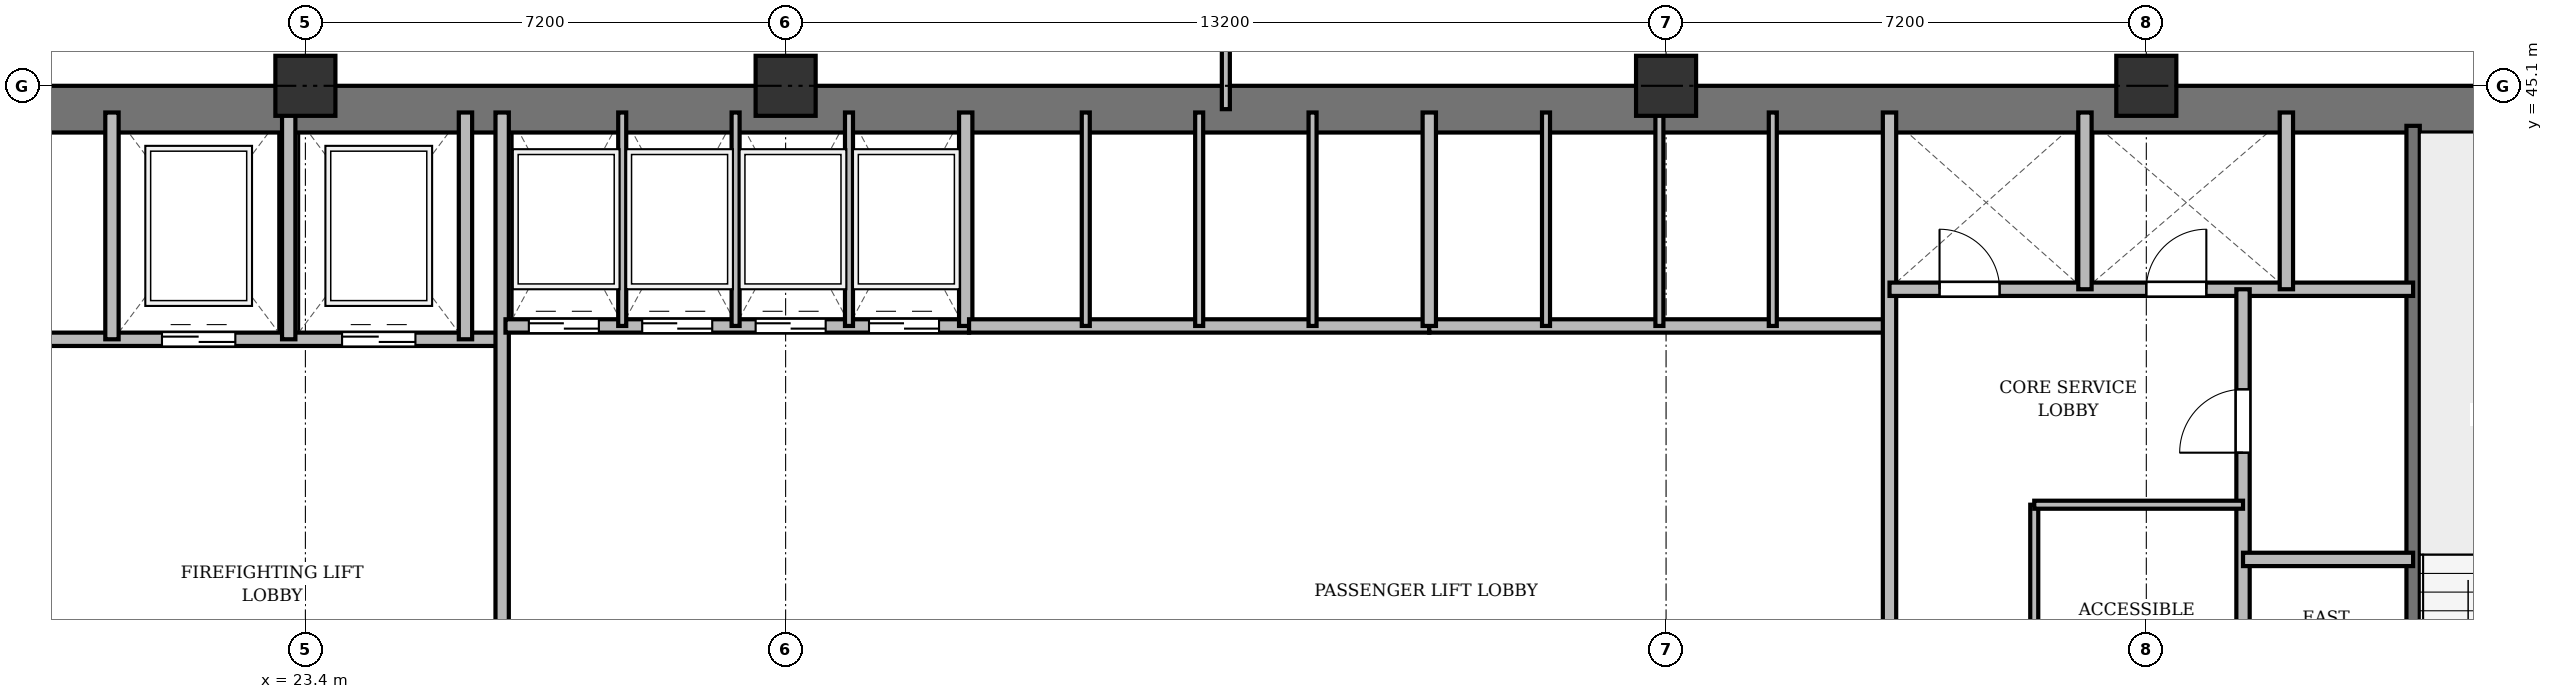
"""IFC4 building model, lengths in metres.
Left out: names, types, materials, properties, quantities, classifications, styles, units other than length and angle.
Written with IfcOpenShell. Run it as: python <this file> out.ifc"""

import sys

from ifc_helpers import new_model, si_unit, direction, frame, frame_2d, origin, origin_2d, place, context, subcontext, project, spatial, rectangle, extrude, source, transform, mapped, element, fill, save


model = new_model("IFC4")
c1 = context("Model", 3, precision=1e-05, world=origin(), true_north=direction((0.0, 1.0)))
c2 = subcontext(c1, "Body", "Model", "MODEL_VIEW")
j1 = project(units=[si_unit("LENGTHUNIT", "METRE"), si_unit("PLANEANGLEUNIT", "RADIAN")], contexts=[c1])
p1 = place(None, origin())
s1 = spatial("IfcSite", under=j1, at=p1, CompositionType="ELEMENT")
p2 = place(p1, origin())
s2 = spatial("IfcBuilding", under=s1, at=p2, CompositionType="ELEMENT")
p3 = place(p2, frame((0.0, 0.0, 55.9)))
s3 = spatial("IfcBuildingStorey", under=s2, at=p3, CompositionType="ELEMENT", Elevation=55.9)
m1 = source(origin(), c2, "Body", "SweptSolid", [
    extrude(rectangle(XDim=0.9, YDim=0.9, at=origin_2d()), origin(), (0.0, 0.0, 1.0), 3.6),
])
for number, where, z_axis, x_axis in (
    (1, (23.4, 45.1, 0.0), (0.0, 0.0, 1.0), (1.0, 0.0, 0.0)),
    (2, (30.6, 45.1, 0.0), (0.0, 0.0, 1.0), (1.0, 0.0, 0.0)),
    (3, (43.8, 45.1, 0.0), (0.0, 0.0, 1.0), (1.0, 0.0, 0.0)),
    (4, (51.0, 45.1, 0.0), (0.0, 0.0, 1.0), (1.0, 0.0, 0.0)),
):
    element("IfcColumn", number, at=place(p3, frame(where, z_axis=z_axis, x_axis=x_axis)), inside=s3, PredefinedType="COLUMN", context=c2, shape_type="MappedRepresentation", body=[
        mapped(m1, transform((0.0, 0.0, 0.0), x_axis=(1.0, 0.0, 0.0), y_axis=(0.0, 1.0, 0.0), z_axis=(0.0, 0.0, 1.0), scale=1.0)),
    ])
p4 = place(p3, frame((15.5, 44.75, 0.0), z_axis=(0.0, 0.0, 1.0), x_axis=(1.0, 0.0, 0.0)))
e5 = element("IfcWall", 5, at=p4, inside=s3, PredefinedType="SHEAR", context=c2, shape_type="SweptSolid", body=[
    extrude(rectangle(XDim=43.4, YDim=0.7, at=frame_2d((21.7, 0.0))), origin(), (0.0, 0.0, 1.0), 3.34),
])
p5 = place(p3, frame((55.0, 33.4, 0.0), z_axis=(0.0, 0.0, 1.0), x_axis=(0.0, 1.0, 0.0)))
e6 = element("IfcWall", 6, at=p5, inside=s3, PredefinedType="SHEAR", context=c2, shape_type="SweptSolid", body=[
    extrude(rectangle(XDim=11.1, YDim=0.2, at=frame_2d((5.55, 0.0))), origin(), (0.0, 0.0, 1.0), 3.34),
])
p6 = place(p5, frame((0.85, 0.0, 0.0)))
e7 = element("IfcOpeningElement", 7, at=p6, cuts=e6, PredefinedType="OPENING", context=c2, shape_type="SweptSolid", body=[
    extrude(rectangle(XDim=1.1, YDim=2.15, at=frame_2d((0.55, 1.075))), frame((0.0, 0.11, 0.0), z_axis=(0.0, -1.0, 0.0), x_axis=(1.0, 0.0, 0.0)), (0.0, 0.0, 1.0), 0.22),
])
p7 = place(p3, frame((19.55, 41.3, 0.0), z_axis=(0.0, 0.0, 1.0), x_axis=(1.0, 0.0, 0.0)))
e8 = element("IfcWall", 8, at=p7, inside=s3, PredefinedType="SOLIDWALL", context=c2, shape_type="SweptSolid", body=[
    extrude(rectangle(XDim=6.75, YDim=0.2, at=frame_2d((3.375, 0.0))), origin(), (0.0, 0.0, 1.0), 3.34),
])
p8 = place(p7, frame((1.7, 0.0, 0.0)))
e9 = element("IfcOpeningElement", 9, at=p8, cuts=e8, PredefinedType="OPENING", context=c2, shape_type="SweptSolid", body=[
    extrude(rectangle(XDim=1.1, YDim=2.15, at=frame_2d((0.55, 1.075))), frame((0.0, 0.11, 0.0), z_axis=(0.0, -1.0, 0.0), x_axis=(1.0, 0.0, 0.0)), (0.0, 0.0, 1.0), 0.22),
])
p9 = place(p7, frame((4.4, 0.0, 0.0)))
e10 = element("IfcOpeningElement", 10, at=p9, cuts=e8, PredefinedType="OPENING", context=c2, shape_type="SweptSolid", body=[
    extrude(rectangle(XDim=1.1, YDim=2.15, at=frame_2d((0.55, 1.075))), frame((0.0, 0.11, 0.0), z_axis=(0.0, -1.0, 0.0), x_axis=(1.0, 0.0, 0.0)), (0.0, 0.0, 1.0), 0.22),
])
for number, where, z_axis, x_axis in (
    (11, (20.5, 41.3, 0.0), (0.0, 0.0, 1.0), (0.0, 1.0, 0.0)),
    (12, (23.15, 41.3, 0.0), (0.0, 0.0, 1.0), (0.0, 1.0, 0.0)),
    (13, (25.8, 41.3, 0.0), (0.0, 0.0, 1.0), (0.0, 1.0, 0.0)),
):
    element("IfcWall", number, at=place(p3, frame(where, z_axis=z_axis, x_axis=x_axis)), inside=s3, PredefinedType="SOLIDWALL", context=c2, shape_type="SweptSolid", body=[
        extrude(rectangle(XDim=3.4, YDim=0.2, at=frame_2d((1.7, 0.0))), origin(), (0.0, 0.0, 1.0), 3.34),
    ])
p10 = place(p3, frame((26.35, 33.4, 0.0), z_axis=(0.0, 0.0, 1.0), x_axis=(0.0, 1.0, 0.0)))
e14 = element("IfcWall", 14, at=p10, inside=s3, PredefinedType="SOLIDWALL", context=c2, shape_type="SweptSolid", body=[
    extrude(rectangle(XDim=11.3, YDim=0.2, at=frame_2d((5.65, 0.0))), origin(), (0.0, 0.0, 1.0), 2.69),
])
p11 = place(p3, frame((26.4, 41.5, 0.0), z_axis=(0.0, 0.0, 1.0), x_axis=(1.0, 0.0, 0.0)))
e15 = element("IfcWall", 15, at=p11, inside=s3, PredefinedType="SOLIDWALL", context=c2, shape_type="SweptSolid", body=[
    extrude(rectangle(XDim=6.95, YDim=0.2, at=frame_2d((3.475, 0.0))), origin(), (0.0, 0.0, 1.0), 3.34),
])
p12 = place(p11, frame((0.35, 0.0, 0.0)))
e16 = element("IfcOpeningElement", 16, at=p12, cuts=e15, PredefinedType="OPENING", context=c2, shape_type="SweptSolid", body=[
    extrude(rectangle(XDim=1.05, YDim=2.15, at=frame_2d((0.525, 1.075))), frame((0.0, 0.11, 0.0), z_axis=(0.0, -1.0, 0.0), x_axis=(1.0, 0.0, 0.0)), (0.0, 0.0, 1.0), 0.22),
])
p13 = place(p11, frame((2.05, 0.0, 0.0)))
e17 = element("IfcOpeningElement", 17, at=p13, cuts=e15, PredefinedType="OPENING", context=c2, shape_type="SweptSolid", body=[
    extrude(rectangle(XDim=1.05, YDim=2.15, at=frame_2d((0.525, 1.075))), frame((0.0, 0.11, 0.0), z_axis=(0.0, -1.0, 0.0), x_axis=(1.0, 0.0, 0.0)), (0.0, 0.0, 1.0), 0.22),
])
p14 = place(p11, frame((3.75, 0.0, 0.0)))
e18 = element("IfcOpeningElement", 18, at=p14, cuts=e15, PredefinedType="OPENING", context=c2, shape_type="SweptSolid", body=[
    extrude(rectangle(XDim=1.05, YDim=2.15, at=frame_2d((0.525, 1.075))), frame((0.0, 0.11, 0.0), z_axis=(0.0, -1.0, 0.0), x_axis=(1.0, 0.0, 0.0)), (0.0, 0.0, 1.0), 0.22),
])
p15 = place(p11, frame((5.45, 0.0, 0.0)))
e19 = element("IfcOpeningElement", 19, at=p15, cuts=e15, PredefinedType="OPENING", context=c2, shape_type="SweptSolid", body=[
    extrude(rectangle(XDim=1.05, YDim=2.15, at=frame_2d((0.525, 1.075))), frame((0.0, 0.11, 0.0), z_axis=(0.0, -1.0, 0.0), x_axis=(1.0, 0.0, 0.0)), (0.0, 0.0, 1.0), 0.22),
])
p16 = place(p3, frame((33.3, 41.5, 0.0), z_axis=(0.0, 0.0, 1.0), x_axis=(0.0, 1.0, 0.0)))
e20 = element("IfcWall", 20, at=p16, inside=s3, PredefinedType="SOLIDWALL", context=c2, shape_type="SweptSolid", body=[
    extrude(rectangle(XDim=3.2, YDim=0.2, at=frame_2d((1.6, 0.0))), origin(), (0.0, 0.0, 1.0), 3.34),
])
for number, where, z_axis, x_axis in (
    (21, (28.15, 41.5, 0.0), (0.0, 0.0, 1.0), (0.0, 1.0, 0.0)),
    (22, (29.85, 41.5, 0.0), (0.0, 0.0, 1.0), (0.0, 1.0, 0.0)),
    (23, (31.55, 41.5, 0.0), (0.0, 0.0, 1.0), (0.0, 1.0, 0.0)),
):
    element("IfcWall", number, at=place(p3, frame(where, z_axis=z_axis, x_axis=x_axis)), inside=s3, PredefinedType="PARTITIONING", context=c2, shape_type="SweptSolid", body=[
        extrude(rectangle(XDim=3.2, YDim=0.12, at=frame_2d((1.6, 0.0))), origin(), (0.0, 0.0, 1.0), 3.34),
    ])
p17 = place(p3, frame((33.35, 41.5, 0.0), z_axis=(0.0, 0.0, 1.0), x_axis=(1.0, 0.0, 0.0)))
e24 = element("IfcWall", 24, at=p17, inside=s3, PredefinedType="SOLIDWALL", context=c2, shape_type="SweptSolid", body=[
    extrude(rectangle(XDim=6.9, YDim=0.2, at=frame_2d((3.45, 0.0))), origin(), (0.0, 0.0, 1.0), 3.34),
])
for number, where, z_axis, x_axis in (
    (25, (35.1, 41.5, 0.0), (0.0, 0.0, 1.0), (0.0, 1.0, 0.0)),
    (26, (36.8, 41.5, 0.0), (0.0, 0.0, 1.0), (0.0, 1.0, 0.0)),
    (27, (38.5, 41.5, 0.0), (0.0, 0.0, 1.0), (0.0, 1.0, 0.0)),
):
    element("IfcWall", number, at=place(p3, frame(where, z_axis=z_axis, x_axis=x_axis)), inside=s3, PredefinedType="PARTITIONING", context=c2, shape_type="SweptSolid", body=[
        extrude(rectangle(XDim=3.2, YDim=0.12, at=frame_2d((1.6, 0.0))), origin(), (0.0, 0.0, 1.0), 3.34),
    ])
p18 = place(p3, frame((40.25, 41.5, 0.0), z_axis=(0.0, 0.0, 1.0), x_axis=(1.0, 0.0, 0.0)))
e28 = element("IfcWall", 28, at=p18, inside=s3, PredefinedType="SOLIDWALL", context=c2, shape_type="SweptSolid", body=[
    extrude(rectangle(XDim=6.9, YDim=0.2, at=frame_2d((3.45, 0.0))), origin(), (0.0, 0.0, 1.0), 2.752),
])
p19 = place(p3, frame((40.25, 41.5, 0.0), z_axis=(0.0, 0.0, 1.0), x_axis=(0.0, 1.0, 0.0)))
e29 = element("IfcWall", 29, at=p19, inside=s3, PredefinedType="SOLIDWALL", context=c2, shape_type="SweptSolid", body=[
    extrude(rectangle(XDim=3.2, YDim=0.2, at=frame_2d((1.6, 0.0))), origin(), (0.0, 0.0, 1.0), 3.34),
])
p20 = place(p3, frame((42.0, 41.5, 0.0), z_axis=(0.0, 0.0, 1.0), x_axis=(0.0, 1.0, 0.0)))
e30 = element("IfcWall", 30, at=p20, inside=s3, PredefinedType="PARTITIONING", context=c2, shape_type="SweptSolid", body=[
    extrude(rectangle(XDim=3.2, YDim=0.12, at=frame_2d((1.6, 0.0))), origin(), (0.0, 0.0, 1.0), 3.34),
])
p21 = place(p3, frame((43.7, 41.5, 0.0), z_axis=(0.0, 0.0, 1.0), x_axis=(0.0, 1.0, 0.0)))
e31 = element("IfcWall", 31, at=p21, inside=s3, PredefinedType="PARTITIONING", context=c2, shape_type="SweptSolid", body=[
    extrude(rectangle(XDim=3.2, YDim=0.12, at=frame_2d((1.6, 0.0))), origin(), (0.0, 0.0, 1.0), 2.752),
])
p22 = place(p3, frame((45.4, 41.5, 0.0), z_axis=(0.0, 0.0, 1.0), x_axis=(0.0, 1.0, 0.0)))
e32 = element("IfcWall", 32, at=p22, inside=s3, PredefinedType="PARTITIONING", context=c2, shape_type="SweptSolid", body=[
    extrude(rectangle(XDim=3.2, YDim=0.12, at=frame_2d((1.6, 0.0))), origin(), (0.0, 0.0, 1.0), 3.34),
])
p23 = place(p3, frame((47.15, 33.4, 0.0), z_axis=(0.0, 0.0, 1.0), x_axis=(0.0, 1.0, 0.0)))
e33 = element("IfcWall", 33, at=p23, inside=s3, PredefinedType="SOLIDWALL", context=c2, shape_type="SweptSolid", body=[
    extrude(rectangle(XDim=11.3, YDim=0.2, at=frame_2d((5.65, 0.0))), origin(), (0.0, 0.0, 1.0), 2.69),
])
p24 = place(p3, frame((47.15, 42.05, 0.0), z_axis=(0.0, 0.0, 1.0), x_axis=(1.0, 0.0, 0.0)))
e34 = element("IfcWall", 34, at=p24, inside=s3, PredefinedType="SOLIDWALL", context=c2, shape_type="SweptSolid", body=[
    extrude(rectangle(XDim=7.85, YDim=0.2, at=frame_2d((3.925, 0.0))), origin(), (0.0, 0.0, 1.0), 2.752),
])
p25 = place(p24, frame((0.75, 0.0, 0.0)))
e35 = element("IfcOpeningElement", 35, at=p25, cuts=e34, PredefinedType="OPENING", context=c2, shape_type="SweptSolid", body=[
    extrude(rectangle(XDim=0.9, YDim=2.1, at=frame_2d((0.45, 1.05))), frame((0.0, 0.11, 0.0), z_axis=(0.0, -1.0, 0.0), x_axis=(1.0, 0.0, 0.0)), (0.0, 0.0, 1.0), 0.22),
])
p26 = place(p24, frame((3.85, 0.0, 0.0)))
e36 = element("IfcOpeningElement", 36, at=p26, cuts=e34, PredefinedType="OPENING", context=c2, shape_type="SweptSolid", body=[
    extrude(rectangle(XDim=0.9, YDim=2.1, at=frame_2d((0.45, 1.05))), frame((0.0, 0.11, 0.0), z_axis=(0.0, -1.0, 0.0), x_axis=(1.0, 0.0, 0.0)), (0.0, 0.0, 1.0), 0.22),
])
for number, where, z_axis, x_axis in (
    (37, (50.08, 42.05, 0.0), (0.0, 0.0, 1.0), (0.0, 1.0, 0.0)),
    (38, (53.1, 42.05, 0.0), (0.0, 0.0, 1.0), (0.0, 1.0, 0.0)),
):
    element("IfcWall", number, at=place(p3, frame(where, z_axis=z_axis, x_axis=x_axis)), inside=s3, PredefinedType="SOLIDWALL", context=c2, shape_type="SweptSolid", body=[
        extrude(rectangle(XDim=2.65, YDim=0.2, at=frame_2d((1.325, 0.0))), origin(), (0.0, 0.0, 1.0), 3.34),
    ])
p27 = place(p3, frame((52.45, 33.4, 0.0), z_axis=(0.0, 0.0, 1.0), x_axis=(0.0, 1.0, 0.0)))
e39 = element("IfcWall", 39, at=p27, inside=s3, PredefinedType="PARTITIONING", context=c2, shape_type="SweptSolid", body=[
    extrude(rectangle(XDim=8.65, YDim=0.2, at=frame_2d((4.325, 0.0))), origin(), (0.0, 0.0, 1.0), 2.69),
])
p28 = place(p27, frame((6.2, 0.0, 0.0)))
e40 = element("IfcOpeningElement", 40, at=p28, cuts=e39, PredefinedType="OPENING", context=c2, shape_type="SweptSolid", body=[
    extrude(rectangle(XDim=0.95, YDim=2.15, at=frame_2d((0.475, 1.075))), frame((0.0, 0.11, 0.0), z_axis=(0.0, -1.0, 0.0), x_axis=(1.0, 0.0, 0.0)), (0.0, 0.0, 1.0), 0.22),
])
p29 = place(p3, frame((52.45, 38.0, 0.0), z_axis=(0.0, 0.0, 1.0), x_axis=(1.0, 0.0, 0.0)))
e41 = element("IfcWall", 41, at=p29, inside=s3, PredefinedType="PARTITIONING", context=c2, shape_type="SweptSolid", body=[
    extrude(rectangle(XDim=2.55, YDim=0.2, at=frame_2d((1.275, 0.0))), origin(), (0.0, 0.0, 1.0), 3.34),
])
p30 = place(p3, frame((49.32, 33.4, 0.0), z_axis=(0.0, 0.0, 1.0), x_axis=(0.0, 1.0, 0.0)))
e42 = element("IfcWall", 42, at=p30, inside=s3, PredefinedType="PARTITIONING", context=c2, shape_type="SweptSolid", body=[
    extrude(rectangle(XDim=5.42, YDim=0.12, at=frame_2d((2.71, 0.0))), origin(), (0.0, 0.0, 1.0), 2.69),
])
p31 = place(p30, frame((1.6, 0.0, 0.0)))
e43 = element("IfcOpeningElement", 43, at=p31, cuts=e42, PredefinedType="OPENING", context=c2, shape_type="SweptSolid", body=[
    extrude(rectangle(XDim=0.95, YDim=2.15, at=frame_2d((0.475, 1.075))), frame((0.0, 0.07, 0.0), z_axis=(0.0, -1.0, 0.0), x_axis=(1.0, 0.0, 0.0)), (0.0, 0.0, 1.0), 0.14),
])
p32 = place(p3, frame((49.32, 38.82, 0.0), z_axis=(0.0, 0.0, 1.0), x_axis=(1.0, 0.0, 0.0)))
e44 = element("IfcWall", 44, at=p32, inside=s3, PredefinedType="PARTITIONING", context=c2, shape_type="SweptSolid", body=[
    extrude(rectangle(XDim=3.13, YDim=0.12, at=frame_2d((1.565, 0.0))), origin(), (0.0, 0.0, 1.0), 2.752),
])
p33 = place(p3, frame((37.2, 44.75, 0.0), z_axis=(0.0, 0.0, 1.0), x_axis=(0.0, 1.0, 0.0)))
e45 = element("IfcWall", 45, at=p33, inside=s3, PredefinedType="PARTITIONING", context=c2, shape_type="SweptSolid", body=[
    extrude(rectangle(XDim=3.61, YDim=0.12, at=frame_2d((1.805, 0.0))), origin(), (0.0, 0.0, 1.0), 2.69),
])
p34 = place(p33, frame((1.1, 0.0, 0.0)))
e46 = element("IfcOpeningElement", 46, at=p34, cuts=e45, PredefinedType="OPENING", context=c2, shape_type="SweptSolid", body=[
    extrude(rectangle(XDim=0.95, YDim=2.15, at=frame_2d((0.475, 1.075))), frame((0.0, 0.07, 0.0), z_axis=(0.0, -1.0, 0.0), x_axis=(1.0, 0.0, 0.0)), (0.0, 0.0, 1.0), 0.14),
])
m2 = source(origin(), c2, "Body", "SweptSolid", [
    extrude(rectangle(XDim=1.1, YDim=2.15, at=frame_2d((0.55, 1.075))), frame((0.0, 0.025, 0.0), z_axis=(0.0, -1.0, 0.0), x_axis=(1.0, 0.0, 0.0)), (0.0, 0.0, 1.0), 0.05),
])
p35 = place(p8, origin())
e47 = element("IfcDoor", 47, at=p35, inside=s3, OperationType="DOUBLE_DOOR_SLIDING", PredefinedType="DOOR", context=c2, shape_type="MappedRepresentation", body=[
    mapped(m2, transform((0.0, 0.0, 0.0), x_axis=(1.0, 0.0, 0.0), y_axis=(0.0, 1.0, 0.0), z_axis=(0.0, 0.0, 1.0), scale=1.0)),
])
fill(e9, e47)
p36 = place(p9, origin())
e48 = element("IfcDoor", 48, at=p36, inside=s3, OperationType="DOUBLE_DOOR_SLIDING", PredefinedType="DOOR", context=c2, shape_type="MappedRepresentation", body=[
    mapped(m2, transform((0.0, 0.0, 0.0), x_axis=(1.0, 0.0, 0.0), y_axis=(0.0, 1.0, 0.0), z_axis=(0.0, 0.0, 1.0), scale=1.0)),
])
fill(e10, e48)
m3 = source(origin(), c2, "Body", "SweptSolid", [
    extrude(rectangle(XDim=1.05, YDim=2.15, at=frame_2d((0.525, 1.075))), frame((0.0, 0.025, 0.0), z_axis=(0.0, -1.0, 0.0), x_axis=(1.0, 0.0, 0.0)), (0.0, 0.0, 1.0), 0.05),
])
p37 = place(p12, origin())
e49 = element("IfcDoor", 49, at=p37, inside=s3, OperationType="DOUBLE_DOOR_SLIDING", PredefinedType="DOOR", context=c2, shape_type="MappedRepresentation", body=[
    mapped(m3, transform((0.0, 0.0, 0.0), x_axis=(1.0, 0.0, 0.0), y_axis=(0.0, 1.0, 0.0), z_axis=(0.0, 0.0, 1.0), scale=1.0)),
])
fill(e16, e49)
p38 = place(p13, origin())
e50 = element("IfcDoor", 50, at=p38, inside=s3, OperationType="DOUBLE_DOOR_SLIDING", PredefinedType="DOOR", context=c2, shape_type="MappedRepresentation", body=[
    mapped(m3, transform((0.0, 0.0, 0.0), x_axis=(1.0, 0.0, 0.0), y_axis=(0.0, 1.0, 0.0), z_axis=(0.0, 0.0, 1.0), scale=1.0)),
])
fill(e17, e50)
p39 = place(p14, origin())
e51 = element("IfcDoor", 51, at=p39, inside=s3, OperationType="DOUBLE_DOOR_SLIDING", PredefinedType="DOOR", context=c2, shape_type="MappedRepresentation", body=[
    mapped(m3, transform((0.0, 0.0, 0.0), x_axis=(1.0, 0.0, 0.0), y_axis=(0.0, 1.0, 0.0), z_axis=(0.0, 0.0, 1.0), scale=1.0)),
])
fill(e18, e51)
p40 = place(p15, origin())
e52 = element("IfcDoor", 52, at=p40, inside=s3, OperationType="DOUBLE_DOOR_SLIDING", PredefinedType="DOOR", context=c2, shape_type="MappedRepresentation", body=[
    mapped(m3, transform((0.0, 0.0, 0.0), x_axis=(1.0, 0.0, 0.0), y_axis=(0.0, 1.0, 0.0), z_axis=(0.0, 0.0, 1.0), scale=1.0)),
])
fill(e19, e52)
m4 = source(origin(), c2, "Body", "SweptSolid", [
    extrude(rectangle(XDim=0.9, YDim=2.1, at=frame_2d((0.45, 1.05))), frame((0.0, 0.025, 0.0), z_axis=(0.0, -1.0, 0.0), x_axis=(1.0, 0.0, 0.0)), (0.0, 0.0, 1.0), 0.05),
])
p41 = place(p25, origin())
e53 = element("IfcDoor", 53, at=p41, inside=s3, OperationType="SINGLE_SWING_LEFT", PredefinedType="DOOR", context=c2, shape_type="MappedRepresentation", body=[
    mapped(m4, transform((0.0, 0.0, 0.0), x_axis=(1.0, 0.0, 0.0), y_axis=(0.0, 1.0, 0.0), z_axis=(0.0, 0.0, 1.0), scale=1.0)),
])
fill(e35, e53)
p42 = place(p26, origin())
e54 = element("IfcDoor", 54, at=p42, inside=s3, OperationType="SINGLE_SWING_RIGHT", PredefinedType="DOOR", context=c2, shape_type="MappedRepresentation", body=[
    mapped(m4, transform((0.0, 0.0, 0.0), x_axis=(1.0, 0.0, 0.0), y_axis=(0.0, 1.0, 0.0), z_axis=(0.0, 0.0, 1.0), scale=1.0)),
])
fill(e36, e54)
m5 = source(origin(), c2, "Body", "SweptSolid", [
    extrude(rectangle(XDim=0.95, YDim=2.15, at=frame_2d((0.475, 1.075))), frame((0.0, 0.025, 0.0), z_axis=(0.0, -1.0, 0.0), x_axis=(1.0, 0.0, 0.0)), (0.0, 0.0, 1.0), 0.05),
])
p43 = place(p28, origin())
e55 = element("IfcDoor", 55, at=p43, inside=s3, OperationType="SINGLE_SWING_LEFT", PredefinedType="DOOR", context=c2, shape_type="MappedRepresentation", body=[
    mapped(m5, transform((0.0, 0.0, 0.0), x_axis=(1.0, 0.0, 0.0), y_axis=(0.0, 1.0, 0.0), z_axis=(0.0, 0.0, 1.0), scale=1.0)),
])
fill(e40, e55)
save(model, sys.argv[1])
